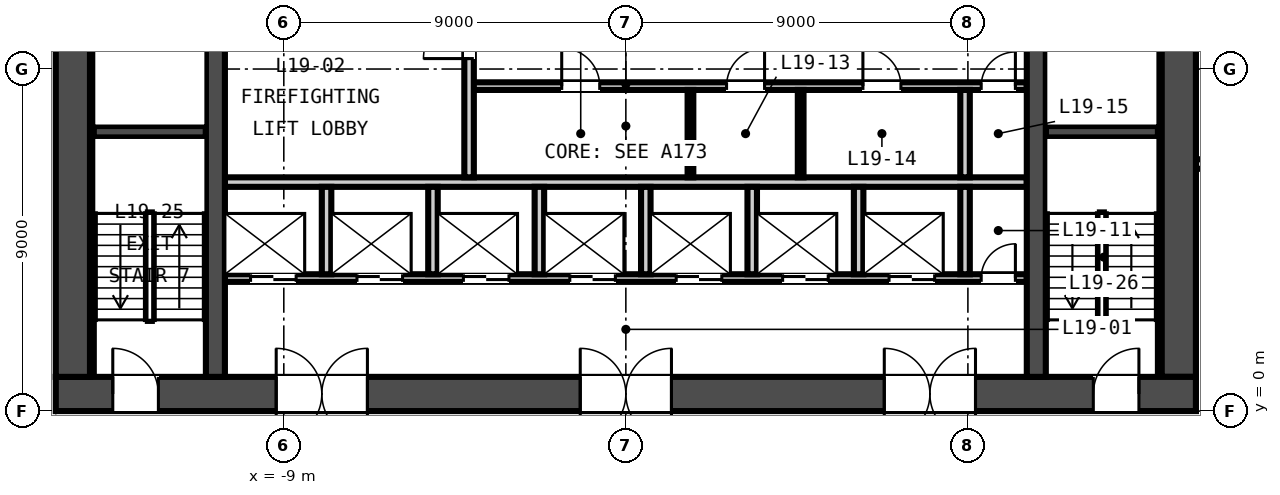
"""IFC4 building model, lengths in metres.
Left out: names, types, materials, properties, quantities, classifications, styles, units other than length and angle.
Written with IfcOpenShell. Run it as: python <this file> out.ifc"""

import sys

from ifc_helpers import new_model, si_unit, direction, frame, frame_2d, origin, place, context, subcontext, project, spatial, rectangle, extrude, element, fill, save


model = new_model("IFC4")
c1 = context("Model", 3, precision=1e-05, world=origin(), true_north=direction((0.0, 1.0)))
c2 = subcontext(c1, "Body", "Model", "MODEL_VIEW")
j1 = project(units=[si_unit("LENGTHUNIT", "METRE"), si_unit("PLANEANGLEUNIT", "RADIAN")], contexts=[c1])
p1 = place(None, origin())
s1 = spatial("IfcSite", under=j1, at=p1, CompositionType="ELEMENT")
p2 = place(p1, origin())
s2 = spatial("IfcBuilding", under=s1, at=p2, CompositionType="ELEMENT")
p3 = place(p2, frame((0.0, 0.0, 84.3)))
s3 = spatial("IfcBuildingStorey", under=s2, at=p3, CompositionType="ELEMENT", Elevation=84.3)
p4 = place(p3, frame((-15.0, 0.45, -0.15), z_axis=(0.0, 0.0, 1.0), x_axis=(1.0, 0.0, 0.0)))
e1 = element("IfcWall", 1, at=p4, inside=s3, PredefinedType="SOLIDWALL", context=c2, shape_type="SweptSolid", body=[
    extrude(rectangle(XDim=30.0, YDim=0.9, at=frame_2d((15.0, 0.0))), origin(), (0.0, 0.0, 1.0), 3.65),
])
p5 = place(p4, frame((5.8, 0.0, 0.15)))
e2 = element("IfcOpeningElement", 2, at=p5, cuts=e1, PredefinedType="OPENING", context=c2, shape_type="SweptSolid", body=[
    extrude(rectangle(XDim=2.4, YDim=2.4, at=frame_2d((1.2, 1.2))), frame((0.0, 0.46, 0.0), z_axis=(0.0, -1.0, 0.0), x_axis=(1.0, 0.0, 0.0)), (0.0, 0.0, 1.0), 0.92),
])
p6 = place(p4, frame((13.8, 0.0, 0.15)))
e3 = element("IfcOpeningElement", 3, at=p6, cuts=e1, PredefinedType="OPENING", context=c2, shape_type="SweptSolid", body=[
    extrude(rectangle(XDim=2.4, YDim=2.4, at=frame_2d((1.2, 1.2))), frame((0.0, 0.46, 0.0), z_axis=(0.0, -1.0, 0.0), x_axis=(1.0, 0.0, 0.0)), (0.0, 0.0, 1.0), 0.92),
])
p7 = place(p4, frame((21.8, 0.0, 0.15)))
e4 = element("IfcOpeningElement", 4, at=p7, cuts=e1, PredefinedType="OPENING", context=c2, shape_type="SweptSolid", body=[
    extrude(rectangle(XDim=2.4, YDim=2.4, at=frame_2d((1.2, 1.2))), frame((0.0, 0.46, 0.0), z_axis=(0.0, -1.0, 0.0), x_axis=(1.0, 0.0, 0.0)), (0.0, 0.0, 1.0), 0.92),
])
p8 = place(p4, frame((1.5, 0.0, 0.15)))
e5 = element("IfcOpeningElement", 5, at=p8, cuts=e1, PredefinedType="OPENING", context=c2, shape_type="SweptSolid", body=[
    extrude(rectangle(XDim=1.2, YDim=2.1, at=frame_2d((0.6, 1.05))), frame((0.0, 0.46, 0.0), z_axis=(0.0, -1.0, 0.0), x_axis=(1.0, 0.0, 0.0)), (0.0, 0.0, 1.0), 0.92),
])
p9 = place(p4, frame((27.3, 0.0, 0.15)))
e6 = element("IfcOpeningElement", 6, at=p9, cuts=e1, PredefinedType="OPENING", context=c2, shape_type="SweptSolid", body=[
    extrude(rectangle(XDim=1.2, YDim=2.1, at=frame_2d((0.6, 1.05))), frame((0.0, 0.46, 0.0), z_axis=(0.0, -1.0, 0.0), x_axis=(1.0, 0.0, 0.0)), (0.0, 0.0, 1.0), 0.92),
])
for number, where, z_axis, x_axis in (
    (7, (-14.55, 0.9, -0.15), (0.0, 0.0, 1.0), (0.0, 1.0, 0.0)),
    (8, (14.55, 0.9, -0.15), (0.0, 0.0, 1.0), (0.0, 1.0, 0.0)),
):
    element("IfcWall", number, at=place(p3, frame(where, z_axis=z_axis, x_axis=x_axis)), inside=s3, PredefinedType="SOLIDWALL", context=c2, shape_type="SweptSolid", body=[
        extrude(rectangle(XDim=13.2, YDim=0.9, at=frame_2d((6.6, 0.0))), origin(), (0.0, 0.0, 1.0), 3.65),
    ])
for number, where, z_axis, x_axis in (
    (9, (-10.8, 0.9, -0.15), (0.0, 0.0, 1.0), (0.0, 1.0, 0.0)),
    (10, (10.8, 0.9, -0.15), (0.0, 0.0, 1.0), (0.0, 1.0, 0.0)),
):
    element("IfcWall", number, at=place(p3, frame(where, z_axis=z_axis, x_axis=x_axis)), inside=s3, PredefinedType="SOLIDWALL", context=c2, shape_type="SweptSolid", body=[
        extrude(rectangle(XDim=13.2, YDim=0.5, at=frame_2d((6.6, 0.0))), origin(), (0.0, 0.0, 1.0), 3.65),
    ])
p10 = place(p3, frame((-10.55, 3.5, 0.0), z_axis=(0.0, 0.0, 1.0), x_axis=(1.0, 0.0, 0.0)))
e11 = element("IfcWall", 11, at=p10, inside=s3, PredefinedType="PARTITIONING", context=c2, shape_type="SweptSolid", body=[
    extrude(rectangle(XDim=21.1, YDim=0.2, at=frame_2d((10.55, 0.0))), origin(), (0.0, 0.0, 1.0), 3.5),
])
p11 = place(p10, frame((0.675, 0.0, 0.0)))
e12 = element("IfcOpeningElement", 12, at=p11, cuts=e11, PredefinedType="OPENING", context=c2, shape_type="SweptSolid", body=[
    extrude(rectangle(XDim=1.2, YDim=2.1, at=frame_2d((0.6, 1.05))), frame((0.0, 0.11, 0.0), z_axis=(0.0, -1.0, 0.0), x_axis=(1.0, 0.0, 0.0)), (0.0, 0.0, 1.0), 0.22),
])
p12 = place(p10, frame((3.475, 0.0, 0.0)))
e13 = element("IfcOpeningElement", 13, at=p12, cuts=e11, PredefinedType="OPENING", context=c2, shape_type="SweptSolid", body=[
    extrude(rectangle(XDim=1.2, YDim=2.1, at=frame_2d((0.6, 1.05))), frame((0.0, 0.11, 0.0), z_axis=(0.0, -1.0, 0.0), x_axis=(1.0, 0.0, 0.0)), (0.0, 0.0, 1.0), 0.22),
])
p13 = place(p10, frame((6.275, 0.0, 0.0)))
e14 = element("IfcOpeningElement", 14, at=p13, cuts=e11, PredefinedType="OPENING", context=c2, shape_type="SweptSolid", body=[
    extrude(rectangle(XDim=1.2, YDim=2.1, at=frame_2d((0.6, 1.05))), frame((0.0, 0.11, 0.0), z_axis=(0.0, -1.0, 0.0), x_axis=(1.0, 0.0, 0.0)), (0.0, 0.0, 1.0), 0.22),
])
p14 = place(p10, frame((9.075, 0.0, 0.0)))
e15 = element("IfcOpeningElement", 15, at=p14, cuts=e11, PredefinedType="OPENING", context=c2, shape_type="SweptSolid", body=[
    extrude(rectangle(XDim=1.2, YDim=2.1, at=frame_2d((0.6, 1.05))), frame((0.0, 0.11, 0.0), z_axis=(0.0, -1.0, 0.0), x_axis=(1.0, 0.0, 0.0)), (0.0, 0.0, 1.0), 0.22),
])
p15 = place(p10, frame((11.875, 0.0, 0.0)))
e16 = element("IfcOpeningElement", 16, at=p15, cuts=e11, PredefinedType="OPENING", context=c2, shape_type="SweptSolid", body=[
    extrude(rectangle(XDim=1.2, YDim=2.1, at=frame_2d((0.6, 1.05))), frame((0.0, 0.11, 0.0), z_axis=(0.0, -1.0, 0.0), x_axis=(1.0, 0.0, 0.0)), (0.0, 0.0, 1.0), 0.22),
])
p16 = place(p10, frame((14.675, 0.0, 0.0)))
e17 = element("IfcOpeningElement", 17, at=p16, cuts=e11, PredefinedType="OPENING", context=c2, shape_type="SweptSolid", body=[
    extrude(rectangle(XDim=1.2, YDim=2.1, at=frame_2d((0.6, 1.05))), frame((0.0, 0.11, 0.0), z_axis=(0.0, -1.0, 0.0), x_axis=(1.0, 0.0, 0.0)), (0.0, 0.0, 1.0), 0.22),
])
p17 = place(p10, frame((17.475, 0.0, 0.0)))
e18 = element("IfcOpeningElement", 18, at=p17, cuts=e11, PredefinedType="OPENING", context=c2, shape_type="SweptSolid", body=[
    extrude(rectangle(XDim=1.2, YDim=2.1, at=frame_2d((0.6, 1.05))), frame((0.0, 0.11, 0.0), z_axis=(0.0, -1.0, 0.0), x_axis=(1.0, 0.0, 0.0)), (0.0, 0.0, 1.0), 0.22),
])
p18 = place(p10, frame((19.9, 0.0, 0.0)))
e19 = element("IfcOpeningElement", 19, at=p18, cuts=e11, PredefinedType="OPENING", context=c2, shape_type="SweptSolid", body=[
    extrude(rectangle(XDim=0.9, YDim=2.1, at=frame_2d((0.45, 1.05))), frame((0.0, 0.11, 0.0), z_axis=(0.0, -1.0, 0.0), x_axis=(1.0, 0.0, 0.0)), (0.0, 0.0, 1.0), 0.22),
])
p19 = place(p3, frame((-10.55, 6.025, 0.0), z_axis=(0.0, 0.0, 1.0), x_axis=(1.0, 0.0, 0.0)))
e20 = element("IfcWall", 20, at=p19, inside=s3, PredefinedType="PARTITIONING", context=c2, shape_type="SweptSolid", body=[
    extrude(rectangle(XDim=21.1, YDim=0.25, at=frame_2d((10.55, 0.0))), origin(), (0.0, 0.0, 1.0), 3.5),
])
p20 = place(p3, frame((-4.125, 8.55, 0.0), z_axis=(0.0, 0.0, 1.0), x_axis=(1.0, 0.0, 0.0)))
e21 = element("IfcWall", 21, at=p20, inside=s3, PredefinedType="PARTITIONING", context=c2, shape_type="SweptSolid", body=[
    extrude(rectangle(XDim=14.675, YDim=0.2, at=frame_2d((7.337, 0.0))), origin(), (0.0, 0.0, 1.0), 3.5),
])
p21 = place(p20, frame((2.438, 0.0, 0.0)))
e22 = element("IfcOpeningElement", 22, at=p21, cuts=e21, PredefinedType="OPENING", context=c2, shape_type="SweptSolid", body=[
    extrude(rectangle(XDim=1.0, YDim=2.1, at=frame_2d((0.5, 1.05))), frame((0.0, 0.11, 0.0), z_axis=(0.0, -1.0, 0.0), x_axis=(1.0, 0.0, 0.0)), (0.0, 0.0, 1.0), 0.22),
])
p22 = place(p20, frame((6.775, 0.0, 0.0)))
e23 = element("IfcOpeningElement", 23, at=p22, cuts=e21, PredefinedType="OPENING", context=c2, shape_type="SweptSolid", body=[
    extrude(rectangle(XDim=1.0, YDim=2.1, at=frame_2d((0.5, 1.05))), frame((0.0, 0.11, 0.0), z_axis=(0.0, -1.0, 0.0), x_axis=(1.0, 0.0, 0.0)), (0.0, 0.0, 1.0), 0.22),
])
p23 = place(p20, frame((10.363, 0.0, 0.0)))
e24 = element("IfcOpeningElement", 24, at=p23, cuts=e21, PredefinedType="OPENING", context=c2, shape_type="SweptSolid", body=[
    extrude(rectangle(XDim=1.0, YDim=2.1, at=frame_2d((0.5, 1.05))), frame((0.0, 0.11, 0.0), z_axis=(0.0, -1.0, 0.0), x_axis=(1.0, 0.0, 0.0)), (0.0, 0.0, 1.0), 0.22),
])
p24 = place(p20, frame((13.475, 0.0, 0.0)))
e25 = element("IfcOpeningElement", 25, at=p24, cuts=e21, PredefinedType="OPENING", context=c2, shape_type="SweptSolid", body=[
    extrude(rectangle(XDim=0.9, YDim=2.1, at=frame_2d((0.45, 1.05))), frame((0.0, 0.11, 0.0), z_axis=(0.0, -1.0, 0.0), x_axis=(1.0, 0.0, 0.0)), (0.0, 0.0, 1.0), 0.22),
])
p25 = place(p3, frame((-4.125, 6.15, 0.0), z_axis=(0.0, 0.0, 1.0), x_axis=(0.0, 1.0, 0.0)))
e26 = element("IfcWall", 26, at=p25, inside=s3, PredefinedType="PARTITIONING", context=c2, shape_type="SweptSolid", body=[
    extrude(rectangle(XDim=4.95, YDim=0.25, at=frame_2d((2.475, 0.0))), origin(), (0.0, 0.0, 1.0), 3.5),
])
p26 = place(p25, frame((3.125, 0.0, 0.0)))
e27 = element("IfcOpeningElement", 27, at=p26, cuts=e26, PredefinedType="OPENING", context=c2, shape_type="SweptSolid", body=[
    extrude(rectangle(XDim=1.2, YDim=2.1, at=frame_2d((0.6, 1.05))), frame((0.0, 0.135, 0.0), z_axis=(0.0, -1.0, 0.0), x_axis=(1.0, 0.0, 0.0)), (0.0, 0.0, 1.0), 0.27),
])
for number, where, z_axis, x_axis in (
    (28, (-7.875, 3.6, 0.0), (0.0, 0.0, 1.0), (0.0, 1.0, 0.0)),
    (29, (-5.075, 3.6, 0.0), (0.0, 0.0, 1.0), (0.0, 1.0, 0.0)),
    (30, (-2.275, 3.6, 0.0), (0.0, 0.0, 1.0), (0.0, 1.0, 0.0)),
    (31, (0.525, 3.6, 0.0), (0.0, 0.0, 1.0), (0.0, 1.0, 0.0)),
    (32, (3.325, 3.6, 0.0), (0.0, 0.0, 1.0), (0.0, 1.0, 0.0)),
    (33, (6.125, 3.6, 0.0), (0.0, 0.0, 1.0), (0.0, 1.0, 0.0)),
    (34, (8.925, 3.6, 0.0), (0.0, 0.0, 1.0), (0.0, 1.0, 0.0)),
):
    element("IfcWall", number, at=place(p3, frame(where, z_axis=z_axis, x_axis=x_axis)), inside=s3, PredefinedType="PARTITIONING", context=c2, shape_type="SweptSolid", body=[
        extrude(rectangle(XDim=2.3, YDim=0.25, at=frame_2d((1.15, 0.0))), origin(), (0.0, 0.0, 1.0), 3.5),
    ])
for number, where, z_axis, x_axis in (
    (35, (1.7, 6.15, 0.0), (0.0, 0.0, 1.0), (0.0, 1.0, 0.0)),
    (36, (4.6, 6.15, 0.0), (0.0, 0.0, 1.0), (0.0, 1.0, 0.0)),
):
    element("IfcWall", number, at=place(p3, frame(where, z_axis=z_axis, x_axis=x_axis)), inside=s3, PredefinedType="PARTITIONING", context=c2, shape_type="SweptSolid", body=[
        extrude(rectangle(XDim=2.3, YDim=0.15, at=frame_2d((1.15, 0.0))), origin(), (0.0, 0.0, 1.0), 3.5),
    ])
p27 = place(p3, frame((8.925, 6.15, 0.0), z_axis=(0.0, 0.0, 1.0), x_axis=(0.0, 1.0, 0.0)))
e37 = element("IfcWall", 37, at=p27, inside=s3, PredefinedType="PARTITIONING", context=c2, shape_type="SweptSolid", body=[
    extrude(rectangle(XDim=2.3, YDim=0.25, at=frame_2d((1.15, 0.0))), origin(), (0.0, 0.0, 1.0), 3.5),
])
p28 = place(p3, frame((-14.0, 7.35, 0.0), z_axis=(0.0, 0.0, 1.0), x_axis=(1.0, 0.0, 0.0)))
e38 = element("IfcWall", 38, at=p28, inside=s3, PredefinedType="SOLIDWALL", context=c2, shape_type="SweptSolid", body=[
    extrude(rectangle(XDim=2.95, YDim=0.3, at=frame_2d((1.475, 0.0))), origin(), (0.0, 0.0, 1.0), 3.5),
])
p29 = place(p3, frame((-14.05, 0.9, 0.0), z_axis=(0.0, 0.0, 1.0), x_axis=(0.0, 1.0, 0.0)))
e39 = element("IfcWall", 39, at=p29, inside=s3, PredefinedType="SOLIDWALL", context=c2, shape_type="SweptSolid", body=[
    extrude(rectangle(XDim=13.2, YDim=0.1, at=frame_2d((6.6, 0.0))), origin(), (0.0, 0.0, 1.0), 3.5),
])
p30 = place(p3, frame((11.05, 7.35, 0.0), z_axis=(0.0, 0.0, 1.0), x_axis=(1.0, 0.0, 0.0)))
e40 = element("IfcWall", 40, at=p30, inside=s3, PredefinedType="SOLIDWALL", context=c2, shape_type="SweptSolid", body=[
    extrude(rectangle(XDim=2.95, YDim=0.3, at=frame_2d((1.475, 0.0))), origin(), (0.0, 0.0, 1.0), 3.5),
])
p31 = place(p3, frame((14.05, 0.9, 0.0), z_axis=(0.0, 0.0, 1.0), x_axis=(0.0, 1.0, 0.0)))
e41 = element("IfcWall", 41, at=p31, inside=s3, PredefinedType="SOLIDWALL", context=c2, shape_type="SweptSolid", body=[
    extrude(rectangle(XDim=13.2, YDim=0.1, at=frame_2d((6.6, 0.0))), origin(), (0.0, 0.0, 1.0), 3.5),
])
p32 = place(p3, frame((15.0, 6.5, 0.0), z_axis=(0.0, 0.0, 1.0), x_axis=(1.0, 0.0, 0.0)))
e42 = element("IfcWall", 42, at=p32, inside=s3, PredefinedType="PARTITIONING", context=c2, shape_type="SweptSolid", body=[
    extrude(rectangle(XDim=3.275, YDim=0.25, at=frame_2d((1.637, 0.0))), origin(), (0.0, 0.0, 1.0), 2.741),
])
p33 = place(p26, origin())
e43 = element("IfcDoor", 43, at=p33, inside=s3, OperationType="SINGLE_SWING_LEFT", PredefinedType="DOOR", context=c2, shape_type="SweptSolid", body=[
    extrude(rectangle(XDim=1.2, YDim=2.1, at=frame_2d((0.6, 1.05))), frame((0.0, 0.025, 0.0), z_axis=(0.0, -1.0, 0.0), x_axis=(1.0, 0.0, 0.0)), (0.0, 0.0, 1.0), 0.05),
])
fill(e27, e43)
p34 = place(p11, origin())
e44 = element("IfcDoor", 44, at=p34, inside=s3, OperationType="DOUBLE_DOOR_SLIDING", PredefinedType="DOOR", context=c2, shape_type="SweptSolid", body=[
    extrude(rectangle(XDim=1.2, YDim=2.1, at=frame_2d((0.6, 1.05))), frame((0.0, 0.025, 0.0), z_axis=(0.0, -1.0, 0.0), x_axis=(1.0, 0.0, 0.0)), (0.0, 0.0, 1.0), 0.05),
])
fill(e12, e44)
p35 = place(p12, origin())
e45 = element("IfcDoor", 45, at=p35, inside=s3, OperationType="DOUBLE_DOOR_SLIDING", PredefinedType="DOOR", context=c2, shape_type="SweptSolid", body=[
    extrude(rectangle(XDim=1.2, YDim=2.1, at=frame_2d((0.6, 1.05))), frame((0.0, 0.025, 0.0), z_axis=(0.0, -1.0, 0.0), x_axis=(1.0, 0.0, 0.0)), (0.0, 0.0, 1.0), 0.05),
])
fill(e13, e45)
p36 = place(p13, origin())
e46 = element("IfcDoor", 46, at=p36, inside=s3, OperationType="DOUBLE_DOOR_SLIDING", PredefinedType="DOOR", context=c2, shape_type="SweptSolid", body=[
    extrude(rectangle(XDim=1.2, YDim=2.1, at=frame_2d((0.6, 1.05))), frame((0.0, 0.025, 0.0), z_axis=(0.0, -1.0, 0.0), x_axis=(1.0, 0.0, 0.0)), (0.0, 0.0, 1.0), 0.05),
])
fill(e14, e46)
p37 = place(p14, origin())
e47 = element("IfcDoor", 47, at=p37, inside=s3, OperationType="DOUBLE_DOOR_SLIDING", PredefinedType="DOOR", context=c2, shape_type="SweptSolid", body=[
    extrude(rectangle(XDim=1.2, YDim=2.1, at=frame_2d((0.6, 1.05))), frame((0.0, 0.025, 0.0), z_axis=(0.0, -1.0, 0.0), x_axis=(1.0, 0.0, 0.0)), (0.0, 0.0, 1.0), 0.05),
])
fill(e15, e47)
p38 = place(p15, origin())
e48 = element("IfcDoor", 48, at=p38, inside=s3, OperationType="DOUBLE_DOOR_SLIDING", PredefinedType="DOOR", context=c2, shape_type="SweptSolid", body=[
    extrude(rectangle(XDim=1.2, YDim=2.1, at=frame_2d((0.6, 1.05))), frame((0.0, 0.025, 0.0), z_axis=(0.0, -1.0, 0.0), x_axis=(1.0, 0.0, 0.0)), (0.0, 0.0, 1.0), 0.05),
])
fill(e16, e48)
p39 = place(p16, origin())
e49 = element("IfcDoor", 49, at=p39, inside=s3, OperationType="DOUBLE_DOOR_SLIDING", PredefinedType="DOOR", context=c2, shape_type="SweptSolid", body=[
    extrude(rectangle(XDim=1.2, YDim=2.1, at=frame_2d((0.6, 1.05))), frame((0.0, 0.025, 0.0), z_axis=(0.0, -1.0, 0.0), x_axis=(1.0, 0.0, 0.0)), (0.0, 0.0, 1.0), 0.05),
])
fill(e17, e49)
p40 = place(p17, origin())
e50 = element("IfcDoor", 50, at=p40, inside=s3, OperationType="DOUBLE_DOOR_SLIDING", PredefinedType="DOOR", context=c2, shape_type="SweptSolid", body=[
    extrude(rectangle(XDim=1.2, YDim=2.1, at=frame_2d((0.6, 1.05))), frame((0.0, 0.025, 0.0), z_axis=(0.0, -1.0, 0.0), x_axis=(1.0, 0.0, 0.0)), (0.0, 0.0, 1.0), 0.05),
])
fill(e18, e50)
p41 = place(p18, origin())
e51 = element("IfcDoor", 51, at=p41, inside=s3, OperationType="SINGLE_SWING_RIGHT", PredefinedType="DOOR", context=c2, shape_type="SweptSolid", body=[
    extrude(rectangle(XDim=0.9, YDim=2.1, at=frame_2d((0.45, 1.05))), frame((0.0, 0.025, 0.0), z_axis=(0.0, -1.0, 0.0), x_axis=(1.0, 0.0, 0.0)), (0.0, 0.0, 1.0), 0.05),
])
fill(e19, e51)
p42 = place(p21, origin())
e52 = element("IfcDoor", 52, at=p42, inside=s3, OperationType="SINGLE_SWING_LEFT", PredefinedType="DOOR", context=c2, shape_type="SweptSolid", body=[
    extrude(rectangle(XDim=1.0, YDim=2.1, at=frame_2d((0.5, 1.05))), frame((0.0, 0.025, 0.0), z_axis=(0.0, -1.0, 0.0), x_axis=(1.0, 0.0, 0.0)), (0.0, 0.0, 1.0), 0.05),
])
fill(e22, e52)
p43 = place(p22, origin())
e53 = element("IfcDoor", 53, at=p43, inside=s3, OperationType="SINGLE_SWING_RIGHT", PredefinedType="DOOR", context=c2, shape_type="SweptSolid", body=[
    extrude(rectangle(XDim=1.0, YDim=2.1, at=frame_2d((0.5, 1.05))), frame((0.0, 0.025, 0.0), z_axis=(0.0, -1.0, 0.0), x_axis=(1.0, 0.0, 0.0)), (0.0, 0.0, 1.0), 0.05),
])
fill(e23, e53)
p44 = place(p23, origin())
e54 = element("IfcDoor", 54, at=p44, inside=s3, OperationType="SINGLE_SWING_LEFT", PredefinedType="DOOR", context=c2, shape_type="SweptSolid", body=[
    extrude(rectangle(XDim=1.0, YDim=2.1, at=frame_2d((0.5, 1.05))), frame((0.0, 0.025, 0.0), z_axis=(0.0, -1.0, 0.0), x_axis=(1.0, 0.0, 0.0)), (0.0, 0.0, 1.0), 0.05),
])
fill(e24, e54)
p45 = place(p24, origin())
e55 = element("IfcDoor", 55, at=p45, inside=s3, OperationType="SINGLE_SWING_RIGHT", PredefinedType="DOOR", context=c2, shape_type="SweptSolid", body=[
    extrude(rectangle(XDim=0.9, YDim=2.1, at=frame_2d((0.45, 1.05))), frame((0.0, 0.025, 0.0), z_axis=(0.0, -1.0, 0.0), x_axis=(1.0, 0.0, 0.0)), (0.0, 0.0, 1.0), 0.05),
])
fill(e25, e55)
p46 = place(p5, origin())
e56 = element("IfcDoor", 56, at=p46, inside=s3, OperationType="DOUBLE_DOOR_DOUBLE_SWING", PredefinedType="DOOR", context=c2, shape_type="SweptSolid", body=[
    extrude(rectangle(XDim=2.4, YDim=2.4, at=frame_2d((1.2, 1.2))), frame((0.0, 0.025, 0.0), z_axis=(0.0, -1.0, 0.0), x_axis=(1.0, 0.0, 0.0)), (0.0, 0.0, 1.0), 0.05),
])
fill(e2, e56)
p47 = place(p6, origin())
e57 = element("IfcDoor", 57, at=p47, inside=s3, OperationType="DOUBLE_DOOR_DOUBLE_SWING", PredefinedType="DOOR", context=c2, shape_type="SweptSolid", body=[
    extrude(rectangle(XDim=2.4, YDim=2.4, at=frame_2d((1.2, 1.2))), frame((0.0, 0.025, 0.0), z_axis=(0.0, -1.0, 0.0), x_axis=(1.0, 0.0, 0.0)), (0.0, 0.0, 1.0), 0.05),
])
fill(e3, e57)
p48 = place(p7, origin())
e58 = element("IfcDoor", 58, at=p48, inside=s3, OperationType="DOUBLE_DOOR_DOUBLE_SWING", PredefinedType="DOOR", context=c2, shape_type="SweptSolid", body=[
    extrude(rectangle(XDim=2.4, YDim=2.4, at=frame_2d((1.2, 1.2))), frame((0.0, 0.025, 0.0), z_axis=(0.0, -1.0, 0.0), x_axis=(1.0, 0.0, 0.0)), (0.0, 0.0, 1.0), 0.05),
])
fill(e4, e58)
p49 = place(p8, origin())
e59 = element("IfcDoor", 59, at=p49, inside=s3, OperationType="SINGLE_SWING_LEFT", PredefinedType="DOOR", context=c2, shape_type="SweptSolid", body=[
    extrude(rectangle(XDim=1.2, YDim=2.1, at=frame_2d((0.6, 1.05))), frame((0.0, 0.025, 0.0), z_axis=(0.0, -1.0, 0.0), x_axis=(1.0, 0.0, 0.0)), (0.0, 0.0, 1.0), 0.05),
])
fill(e5, e59)
p50 = place(p9, origin())
e60 = element("IfcDoor", 60, at=p50, inside=s3, OperationType="SINGLE_SWING_RIGHT", PredefinedType="DOOR", context=c2, shape_type="SweptSolid", body=[
    extrude(rectangle(XDim=1.2, YDim=2.1, at=frame_2d((0.6, 1.05))), frame((0.0, 0.025, 0.0), z_axis=(0.0, -1.0, 0.0), x_axis=(1.0, 0.0, 0.0)), (0.0, 0.0, 1.0), 0.05),
])
fill(e6, e60)
save(model, sys.argv[1])
